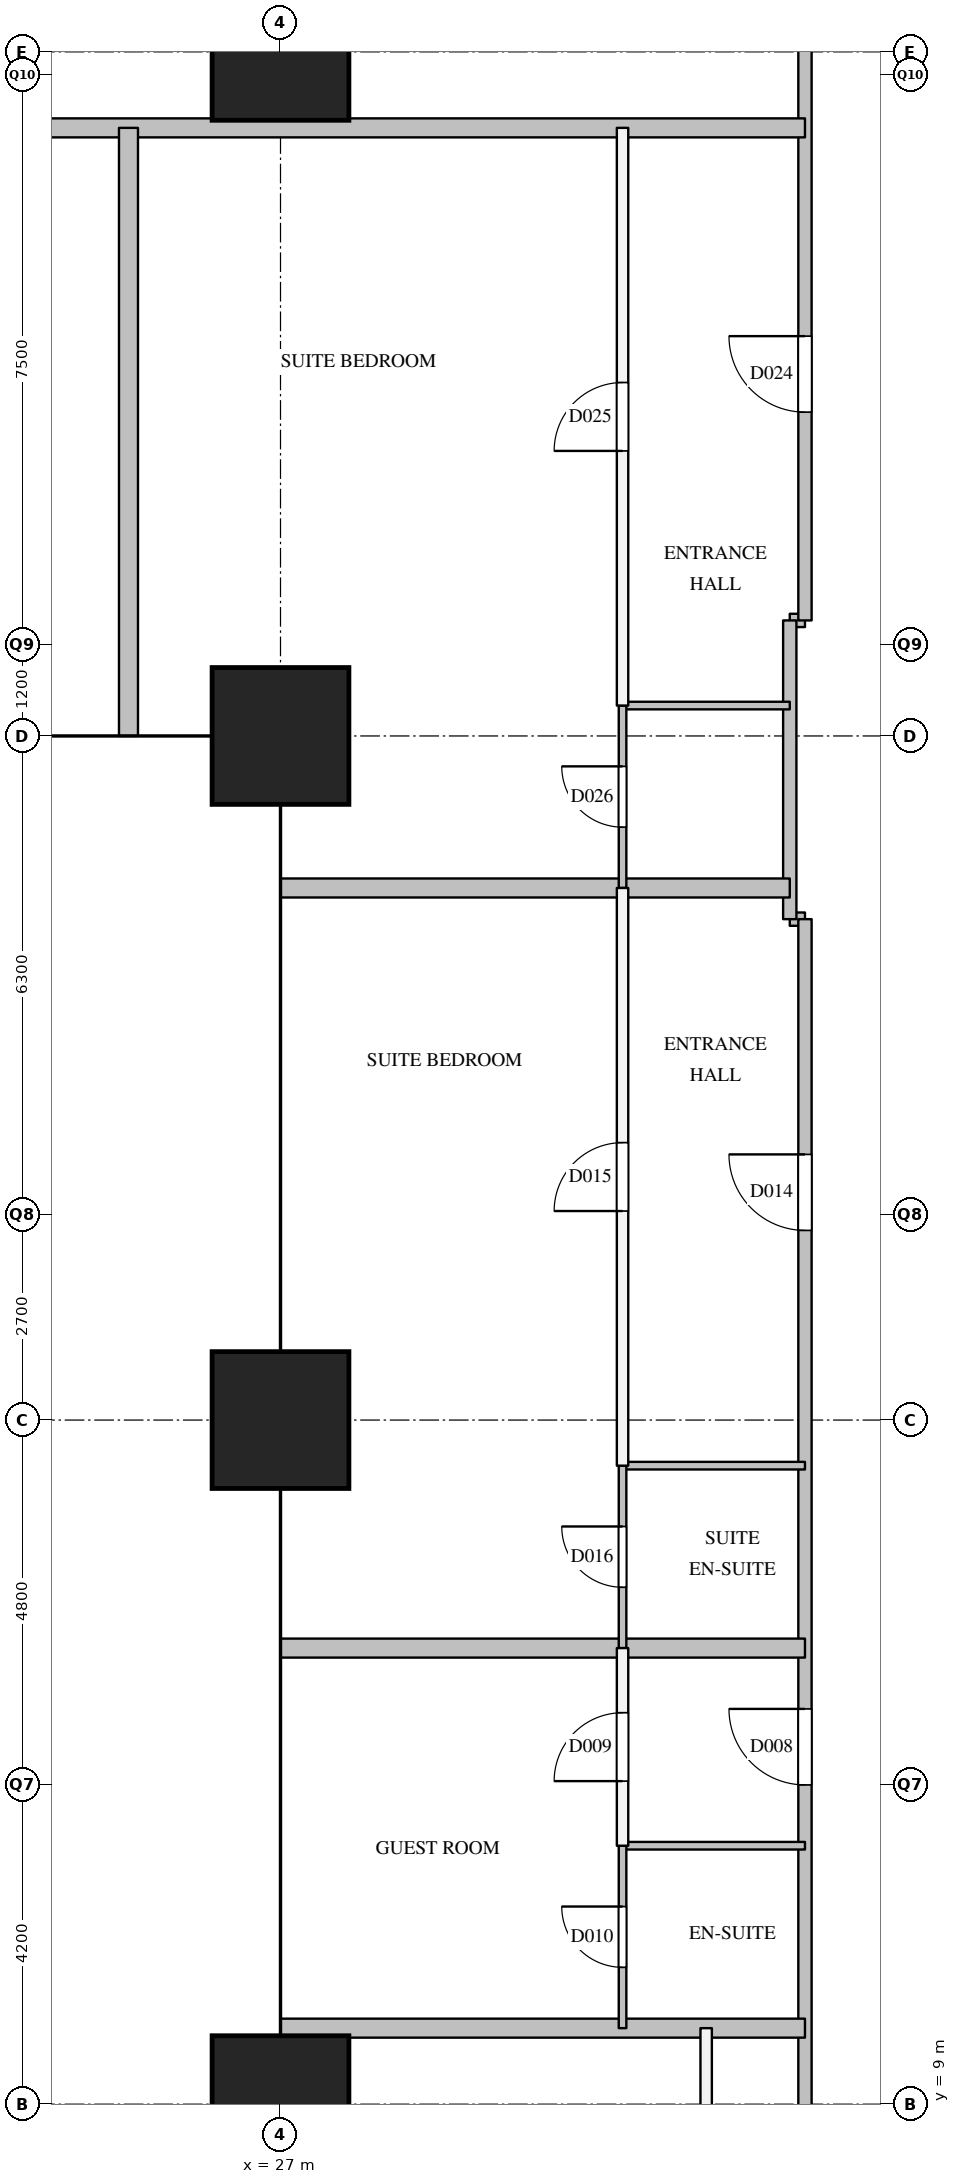
"""IFC4 building model, lengths in metres.
Left out: names, types, materials, properties, quantities, classifications, styles, units other than length and angle.
Written with IfcOpenShell. Run it as: python <this file> out.ifc"""

import sys

from ifc_helpers import new_model, si_unit, direction, frame, frame_2d, origin, origin_2d, place, context, subcontext, project, spatial, rectangle, extrude, element, fill, save


model = new_model("IFC4")
c1 = context("Model", 3, precision=1e-05, world=origin(), true_north=direction((0.0, 1.0)))
c2 = subcontext(c1, "Body", "Model", "MODEL_VIEW")
j1 = project(units=[si_unit("LENGTHUNIT", "METRE"), si_unit("PLANEANGLEUNIT", "RADIAN")], contexts=[c1])
p1 = place(None, origin())
s1 = spatial("IfcSite", under=j1, at=p1, CompositionType="ELEMENT")
p2 = place(p1, origin())
s2 = spatial("IfcBuilding", under=s1, at=p2, CompositionType="ELEMENT")
p3 = place(p2, frame((0.0, 0.0, 85.4)))
s3 = spatial("IfcBuildingStorey", under=s2, at=p3, CompositionType="ELEMENT", Elevation=85.4)
for number, where, z_axis, x_axis in (
    (1, (27.0, 9.0, 0.0), (0.0, 0.0, 1.0), (1.0, 0.0, 0.0)),
    (2, (27.0, 18.0, 0.0), (0.0, 0.0, 1.0), (1.0, 0.0, 0.0)),
    (3, (27.0, 27.0, 0.0), (0.0, 0.0, 1.0), (1.0, 0.0, 0.0)),
    (4, (27.0, 36.0, 0.0), (0.0, 0.0, 1.0), (1.0, 0.0, 0.0)),
):
    element("IfcColumn", number, at=place(p3, frame(where, z_axis=z_axis, x_axis=x_axis)), inside=s3, PredefinedType="COLUMN", context=c2, shape_type="SweptSolid", body=[
        extrude(rectangle(XDim=1.8, YDim=1.8, at=origin_2d()), origin(), (0.0, 0.0, 1.0), 3.8),
    ])
for number, where, z_axis, x_axis in (
    (5, (33.7, 24.59, 0.0), (0.0, 0.0, 1.0), (1.0, 0.0, 0.0)),
    (6, (33.7, 28.52, 0.0), (0.0, 0.0, 1.0), (1.0, 0.0, 0.0)),
):
    element("IfcWall", number, at=place(p3, frame(where, z_axis=z_axis, x_axis=x_axis)), inside=s3, PredefinedType="PARTITIONING", context=c2, shape_type="SweptSolid", body=[
        extrude(rectangle(XDim=0.2, YDim=0.175, at=frame_2d((0.1, 0.0))), origin(), (0.0, 0.0, 1.0), 3.5),
    ])
p4 = place(p3, frame((33.7, 24.59, 0.0), z_axis=(0.0, 0.0, 1.0), x_axis=(0.0, 1.0, 0.0)))
e7 = element("IfcWall", 7, at=p4, inside=s3, PredefinedType="PARTITIONING", context=c2, shape_type="SweptSolid", body=[
    extrude(rectangle(XDim=3.93, YDim=0.175, at=frame_2d((1.965, 0.0))), origin(), (0.0, 0.0, 1.0), 2.5),
])
p5 = place(p3, frame((33.9, 6.9, 0.0), z_axis=(0.0, 0.0, 1.0), x_axis=(0.0, 1.0, 0.0)))
e8 = element("IfcWall", 8, at=p5, inside=s3, PredefinedType="PARTITIONING", context=c2, shape_type="SweptSolid", body=[
    extrude(rectangle(XDim=17.69, YDim=0.175, at=frame_2d((8.845, 0.0))), origin(), (0.0, 0.0, 1.0), 3.5),
])
p6 = place(p5, frame((1.05, 0.0, 0.0)))
e9 = element("IfcOpeningElement", 9, at=p6, cuts=e8, PredefinedType="OPENING", context=c2, shape_type="SweptSolid", body=[
    extrude(rectangle(XDim=1.0, YDim=2.1, at=frame_2d((0.5, 1.05))), frame((0.0, 0.097, 0.0), z_axis=(0.0, -1.0, 0.0), x_axis=(1.0, 0.0, 0.0)), (0.0, 0.0, 1.0), 0.195),
])
p7 = place(p5, frame((6.3, 0.0, 0.0)))
e10 = element("IfcOpeningElement", 10, at=p7, cuts=e8, PredefinedType="OPENING", context=c2, shape_type="SweptSolid", body=[
    extrude(rectangle(XDim=1.0, YDim=2.1, at=frame_2d((0.5, 1.05))), frame((0.0, 0.097, 0.0), z_axis=(0.0, -1.0, 0.0), x_axis=(1.0, 0.0, 0.0)), (0.0, 0.0, 1.0), 0.195),
])
p8 = place(p5, frame((13.595, 0.0, 0.0)))
e11 = element("IfcOpeningElement", 11, at=p8, cuts=e8, PredefinedType="OPENING", context=c2, shape_type="SweptSolid", body=[
    extrude(rectangle(XDim=1.0, YDim=2.1, at=frame_2d((0.5, 1.05))), frame((0.0, 0.097, 0.0), z_axis=(0.0, -1.0, 0.0), x_axis=(1.0, 0.0, 0.0)), (0.0, 0.0, 1.0), 0.195),
])
p9 = place(p3, frame((33.9, 28.52, 0.0), z_axis=(0.0, 0.0, 1.0), x_axis=(0.0, 1.0, 0.0)))
e12 = element("IfcWall", 12, at=p9, inside=s3, PredefinedType="PARTITIONING", context=c2, shape_type="SweptSolid", body=[
    extrude(rectangle(XDim=23.58, YDim=0.175, at=frame_2d((11.79, 0.0))), origin(), (0.0, 0.0, 1.0), 3.5),
])
p10 = place(p9, frame((2.74, 0.0, 0.0)))
e13 = element("IfcOpeningElement", 13, at=p10, cuts=e12, PredefinedType="OPENING", context=c2, shape_type="SweptSolid", body=[
    extrude(rectangle(XDim=1.0, YDim=2.1, at=frame_2d((0.5, 1.05))), frame((0.0, 0.097, 0.0), z_axis=(0.0, -1.0, 0.0), x_axis=(1.0, 0.0, 0.0)), (0.0, 0.0, 1.0), 0.195),
])
p11 = place(p9, frame((8.48, 0.0, 0.0)))
e14 = element("IfcOpeningElement", 14, at=p11, cuts=e12, PredefinedType="OPENING", context=c2, shape_type="SweptSolid", body=[
    extrude(rectangle(XDim=1.0, YDim=2.1, at=frame_2d((0.5, 1.05))), frame((0.0, 0.097, 0.0), z_axis=(0.0, -1.0, 0.0), x_axis=(1.0, 0.0, 0.0)), (0.0, 0.0, 1.0), 0.195),
])
p12 = place(p9, frame((13.48, 0.0, 0.0)))
e15 = element("IfcOpeningElement", 15, at=p12, cuts=e12, PredefinedType="OPENING", context=c2, shape_type="SweptSolid", body=[
    extrude(rectangle(XDim=1.0, YDim=2.1, at=frame_2d((0.5, 1.05))), frame((0.0, 0.097, 0.0), z_axis=(0.0, -1.0, 0.0), x_axis=(1.0, 0.0, 0.0)), (0.0, 0.0, 1.0), 0.195),
])
p13 = place(p3, frame((31.5, 12.4, 0.0), z_axis=(0.0, 0.0, 1.0), x_axis=(0.0, 1.0, 0.0)))
e16 = element("IfcWall", 16, at=p13, inside=s3, PredefinedType="PARTITIONING", context=c2, shape_type="SweptSolid", body=[
    extrude(rectangle(XDim=2.6, YDim=0.15, at=frame_2d((1.3, 0.0))), origin(), (0.0, 0.0, 1.0), 3.5),
])
p14 = place(p13, frame((0.85, 0.0, 0.0)))
e17 = element("IfcOpeningElement", 17, at=p14, cuts=e16, PredefinedType="OPENING", context=c2, shape_type="SweptSolid", body=[
    extrude(rectangle(XDim=0.9, YDim=2.1, at=frame_2d((0.45, 1.05))), frame((0.0, 0.085, 0.0), z_axis=(0.0, -1.0, 0.0), x_axis=(1.0, 0.0, 0.0)), (0.0, 0.0, 1.0), 0.17),
])
p15 = place(p3, frame((31.5, 17.4, 0.0), z_axis=(0.0, 0.0, 1.0), x_axis=(0.0, 1.0, 0.0)))
e18 = element("IfcWall", 18, at=p15, inside=s3, PredefinedType="PARTITIONING", context=c2, shape_type="SweptSolid", body=[
    extrude(rectangle(XDim=7.6, YDim=0.15, at=frame_2d((3.8, 0.0))), origin(), (0.0, 0.0, 1.0), 3.5),
])
p16 = place(p15, frame((3.35, 0.0, 0.0)))
e19 = element("IfcOpeningElement", 19, at=p16, cuts=e18, PredefinedType="OPENING", context=c2, shape_type="SweptSolid", body=[
    extrude(rectangle(XDim=0.9, YDim=2.1, at=frame_2d((0.45, 1.05))), frame((0.0, 0.085, 0.0), z_axis=(0.0, -1.0, 0.0), x_axis=(1.0, 0.0, 0.0)), (0.0, 0.0, 1.0), 0.17),
])
p17 = place(p3, frame((31.5, 27.4, 0.0), z_axis=(0.0, 0.0, 1.0), x_axis=(0.0, 1.0, 0.0)))
e20 = element("IfcWall", 20, at=p17, inside=s3, PredefinedType="PARTITIONING", context=c2, shape_type="SweptSolid", body=[
    extrude(rectangle(XDim=7.6, YDim=0.15, at=frame_2d((3.8, 0.0))), origin(), (0.0, 0.0, 1.0), 2.5),
])
p18 = place(p17, frame((3.35, 0.0, 0.0)))
e21 = element("IfcOpeningElement", 21, at=p18, cuts=e20, PredefinedType="OPENING", context=c2, shape_type="SweptSolid", body=[
    extrude(rectangle(XDim=0.9, YDim=2.1, at=frame_2d((0.45, 1.05))), frame((0.0, 0.085, 0.0), z_axis=(0.0, -1.0, 0.0), x_axis=(1.0, 0.0, 0.0)), (0.0, 0.0, 1.0), 0.17),
])
p19 = place(p3, frame((32.6, 2.4, 0.0), z_axis=(0.0, 0.0, 1.0), x_axis=(0.0, 1.0, 0.0)))
e22 = element("IfcWall", 22, at=p19, inside=s3, PredefinedType="PARTITIONING", context=c2, shape_type="SweptSolid", body=[
    extrude(rectangle(XDim=7.6, YDim=0.15, at=frame_2d((3.8, 0.0))), origin(), (0.0, 0.0, 1.0), 3.5),
])
p20 = place(p19, frame((3.35, 0.0, 0.0)))
e23 = element("IfcOpeningElement", 23, at=p20, cuts=e22, PredefinedType="OPENING", context=c2, shape_type="SweptSolid", body=[
    extrude(rectangle(XDim=0.9, YDim=2.1, at=frame_2d((0.45, 1.05))), frame((0.0, 0.085, 0.0), z_axis=(0.0, -1.0, 0.0), x_axis=(1.0, 0.0, 0.0)), (0.0, 0.0, 1.0), 0.17),
])
for number, where, z_axis, x_axis in (
    (24, (27.0, 10.0, 0.0), (0.0, 0.0, 1.0), (1.0, 0.0, 0.0)),
    (25, (27.0, 15.0, 0.0), (0.0, 0.0, 1.0), (1.0, 0.0, 0.0)),
):
    element("IfcWall", number, at=place(p3, frame(where, z_axis=z_axis, x_axis=x_axis)), inside=s3, PredefinedType="PARTITIONING", context=c2, shape_type="SweptSolid", body=[
        extrude(rectangle(XDim=6.9, YDim=0.25, at=frame_2d((3.45, 0.0))), origin(), (0.0, 0.0, 1.0), 2.5),
    ])
p21 = place(p3, frame((27.0, 25.0, 0.0), z_axis=(0.0, 0.0, 1.0), x_axis=(1.0, 0.0, 0.0)))
e26 = element("IfcWall", 26, at=p21, inside=s3, PredefinedType="PARTITIONING", context=c2, shape_type="SweptSolid", body=[
    extrude(rectangle(XDim=6.7, YDim=0.25, at=frame_2d((3.35, 0.0))), origin(), (0.0, 0.0, 1.0), 2.5),
])
p22 = place(p3, frame((20.1, 35.0, 0.0), z_axis=(0.0, 0.0, 1.0), x_axis=(1.0, 0.0, 0.0)))
e27 = element("IfcWall", 27, at=p22, inside=s3, PredefinedType="PARTITIONING", context=c2, shape_type="SweptSolid", body=[
    extrude(rectangle(XDim=13.8, YDim=0.25, at=frame_2d((6.9, 0.0))), origin(), (0.0, 0.0, 1.0), 2.5),
])
p23 = place(p3, frame((25.0, 27.0, 0.0), z_axis=(0.0, 0.0, 1.0), x_axis=(0.0, 1.0, 0.0)))
e28 = element("IfcWall", 28, at=p23, inside=s3, PredefinedType="PARTITIONING", context=c2, shape_type="SweptSolid", body=[
    extrude(rectangle(XDim=8.0, YDim=0.25, at=frame_2d((4.0, 0.0))), origin(), (0.0, 0.0, 1.0), 2.5),
])
for number, where, z_axis, x_axis in (
    (29, (31.5, 12.4, 0.0), (0.0, 0.0, 1.0), (1.0, 0.0, 0.0)),
    (30, (31.5, 17.4, 0.0), (0.0, 0.0, 1.0), (1.0, 0.0, 0.0)),
):
    element("IfcWall", number, at=place(p3, frame(where, z_axis=z_axis, x_axis=x_axis)), inside=s3, PredefinedType="PARTITIONING", context=c2, shape_type="SweptSolid", body=[
        extrude(rectangle(XDim=2.4, YDim=0.1, at=frame_2d((1.2, 0.0))), origin(), (0.0, 0.0, 1.0), 3.5),
    ])
p24 = place(p3, frame((31.5, 27.4, 0.0), z_axis=(0.0, 0.0, 1.0), x_axis=(1.0, 0.0, 0.0)))
e31 = element("IfcWall", 31, at=p24, inside=s3, PredefinedType="PARTITIONING", context=c2, shape_type="SweptSolid", body=[
    extrude(rectangle(XDim=2.2, YDim=0.1, at=frame_2d((1.1, 0.0))), origin(), (0.0, 0.0, 1.0), 2.5),
])
p25 = place(p3, frame((31.5, 10.0, 0.0), z_axis=(0.0, 0.0, 1.0), x_axis=(0.0, 1.0, 0.0)))
e32 = element("IfcWall", 32, at=p25, inside=s3, PredefinedType="PARTITIONING", context=c2, shape_type="SweptSolid", body=[
    extrude(rectangle(XDim=2.4, YDim=0.1, at=frame_2d((1.2, 0.0))), origin(), (0.0, 0.0, 1.0), 3.5),
])
p26 = place(p25, frame((0.8, 0.0, 0.0)))
e33 = element("IfcOpeningElement", 33, at=p26, cuts=e32, PredefinedType="OPENING", context=c2, shape_type="SweptSolid", body=[
    extrude(rectangle(XDim=0.8, YDim=2.1, at=frame_2d((0.4, 1.05))), frame((0.0, 0.06, 0.0), z_axis=(0.0, -1.0, 0.0), x_axis=(1.0, 0.0, 0.0)), (0.0, 0.0, 1.0), 0.12),
])
p27 = place(p3, frame((31.5, 15.0, 0.0), z_axis=(0.0, 0.0, 1.0), x_axis=(0.0, 1.0, 0.0)))
e34 = element("IfcWall", 34, at=p27, inside=s3, PredefinedType="PARTITIONING", context=c2, shape_type="SweptSolid", body=[
    extrude(rectangle(XDim=2.4, YDim=0.1, at=frame_2d((1.2, 0.0))), origin(), (0.0, 0.0, 1.0), 3.5),
])
p28 = place(p27, frame((0.8, 0.0, 0.0)))
e35 = element("IfcOpeningElement", 35, at=p28, cuts=e34, PredefinedType="OPENING", context=c2, shape_type="SweptSolid", body=[
    extrude(rectangle(XDim=0.8, YDim=2.1, at=frame_2d((0.4, 1.05))), frame((0.0, 0.06, 0.0), z_axis=(0.0, -1.0, 0.0), x_axis=(1.0, 0.0, 0.0)), (0.0, 0.0, 1.0), 0.12),
])
p29 = place(p3, frame((31.5, 25.0, 0.0), z_axis=(0.0, 0.0, 1.0), x_axis=(0.0, 1.0, 0.0)))
e36 = element("IfcWall", 36, at=p29, inside=s3, PredefinedType="PARTITIONING", context=c2, shape_type="SweptSolid", body=[
    extrude(rectangle(XDim=2.4, YDim=0.1, at=frame_2d((1.2, 0.0))), origin(), (0.0, 0.0, 1.0), 2.5),
])
p30 = place(p29, frame((0.8, 0.0, 0.0)))
e37 = element("IfcOpeningElement", 37, at=p30, cuts=e36, PredefinedType="OPENING", context=c2, shape_type="SweptSolid", body=[
    extrude(rectangle(XDim=0.8, YDim=2.1, at=frame_2d((0.4, 1.05))), frame((0.0, 0.06, 0.0), z_axis=(0.0, -1.0, 0.0), x_axis=(1.0, 0.0, 0.0)), (0.0, 0.0, 1.0), 0.12),
])
p31 = place(p7, origin())
e38 = element("IfcDoor", 38, at=p31, inside=s3, OperationType="SINGLE_SWING_RIGHT", PredefinedType="DOOR", context=c2, shape_type="SweptSolid", body=[
    extrude(rectangle(XDim=1.0, YDim=2.1, at=frame_2d((0.5, 1.05))), frame((0.0, 0.025, 0.0), z_axis=(0.0, -1.0, 0.0), x_axis=(1.0, 0.0, 0.0)), (0.0, 0.0, 1.0), 0.05),
])
fill(e10, e38)
p32 = place(p14, origin())
e39 = element("IfcDoor", 39, at=p32, inside=s3, OperationType="SINGLE_SWING_LEFT", PredefinedType="DOOR", context=c2, shape_type="SweptSolid", body=[
    extrude(rectangle(XDim=0.9, YDim=2.1, at=frame_2d((0.45, 1.05))), frame((0.0, 0.025, 0.0), z_axis=(0.0, -1.0, 0.0), x_axis=(1.0, 0.0, 0.0)), (0.0, 0.0, 1.0), 0.05),
])
fill(e17, e39)
p33 = place(p26, origin())
e40 = element("IfcDoor", 40, at=p33, inside=s3, OperationType="SINGLE_SWING_RIGHT", PredefinedType="DOOR", context=c2, shape_type="SweptSolid", body=[
    extrude(rectangle(XDim=0.8, YDim=2.1, at=frame_2d((0.4, 1.05))), frame((0.0, 0.025, 0.0), z_axis=(0.0, -1.0, 0.0), x_axis=(1.0, 0.0, 0.0)), (0.0, 0.0, 1.0), 0.05),
])
fill(e33, e40)
p34 = place(p8, origin())
e41 = element("IfcDoor", 41, at=p34, inside=s3, OperationType="SINGLE_SWING_RIGHT", PredefinedType="DOOR", context=c2, shape_type="SweptSolid", body=[
    extrude(rectangle(XDim=1.0, YDim=2.1, at=frame_2d((0.5, 1.05))), frame((0.0, 0.025, 0.0), z_axis=(0.0, -1.0, 0.0), x_axis=(1.0, 0.0, 0.0)), (0.0, 0.0, 1.0), 0.05),
])
fill(e11, e41)
p35 = place(p16, origin())
e42 = element("IfcDoor", 42, at=p35, inside=s3, OperationType="SINGLE_SWING_LEFT", PredefinedType="DOOR", context=c2, shape_type="SweptSolid", body=[
    extrude(rectangle(XDim=0.9, YDim=2.1, at=frame_2d((0.45, 1.05))), frame((0.0, 0.025, 0.0), z_axis=(0.0, -1.0, 0.0), x_axis=(1.0, 0.0, 0.0)), (0.0, 0.0, 1.0), 0.05),
])
fill(e19, e42)
p36 = place(p28, origin())
e43 = element("IfcDoor", 43, at=p36, inside=s3, OperationType="SINGLE_SWING_RIGHT", PredefinedType="DOOR", context=c2, shape_type="SweptSolid", body=[
    extrude(rectangle(XDim=0.8, YDim=2.1, at=frame_2d((0.4, 1.05))), frame((0.0, 0.025, 0.0), z_axis=(0.0, -1.0, 0.0), x_axis=(1.0, 0.0, 0.0)), (0.0, 0.0, 1.0), 0.05),
])
fill(e35, e43)
p37 = place(p10, origin())
e44 = element("IfcDoor", 44, at=p37, inside=s3, OperationType="SINGLE_SWING_RIGHT", PredefinedType="DOOR", context=c2, shape_type="SweptSolid", body=[
    extrude(rectangle(XDim=1.0, YDim=2.1, at=frame_2d((0.5, 1.05))), frame((0.0, 0.025, 0.0), z_axis=(0.0, -1.0, 0.0), x_axis=(1.0, 0.0, 0.0)), (0.0, 0.0, 1.0), 0.05),
])
fill(e13, e44)
p38 = place(p18, origin())
e45 = element("IfcDoor", 45, at=p38, inside=s3, OperationType="SINGLE_SWING_LEFT", PredefinedType="DOOR", context=c2, shape_type="SweptSolid", body=[
    extrude(rectangle(XDim=0.9, YDim=2.1, at=frame_2d((0.45, 1.05))), frame((0.0, 0.025, 0.0), z_axis=(0.0, -1.0, 0.0), x_axis=(1.0, 0.0, 0.0)), (0.0, 0.0, 1.0), 0.05),
])
fill(e21, e45)
p39 = place(p30, origin())
e46 = element("IfcDoor", 46, at=p39, inside=s3, OperationType="SINGLE_SWING_RIGHT", PredefinedType="DOOR", context=c2, shape_type="SweptSolid", body=[
    extrude(rectangle(XDim=0.8, YDim=2.1, at=frame_2d((0.4, 1.05))), frame((0.0, 0.025, 0.0), z_axis=(0.0, -1.0, 0.0), x_axis=(1.0, 0.0, 0.0)), (0.0, 0.0, 1.0), 0.05),
])
fill(e37, e46)
save(model, sys.argv[1])
